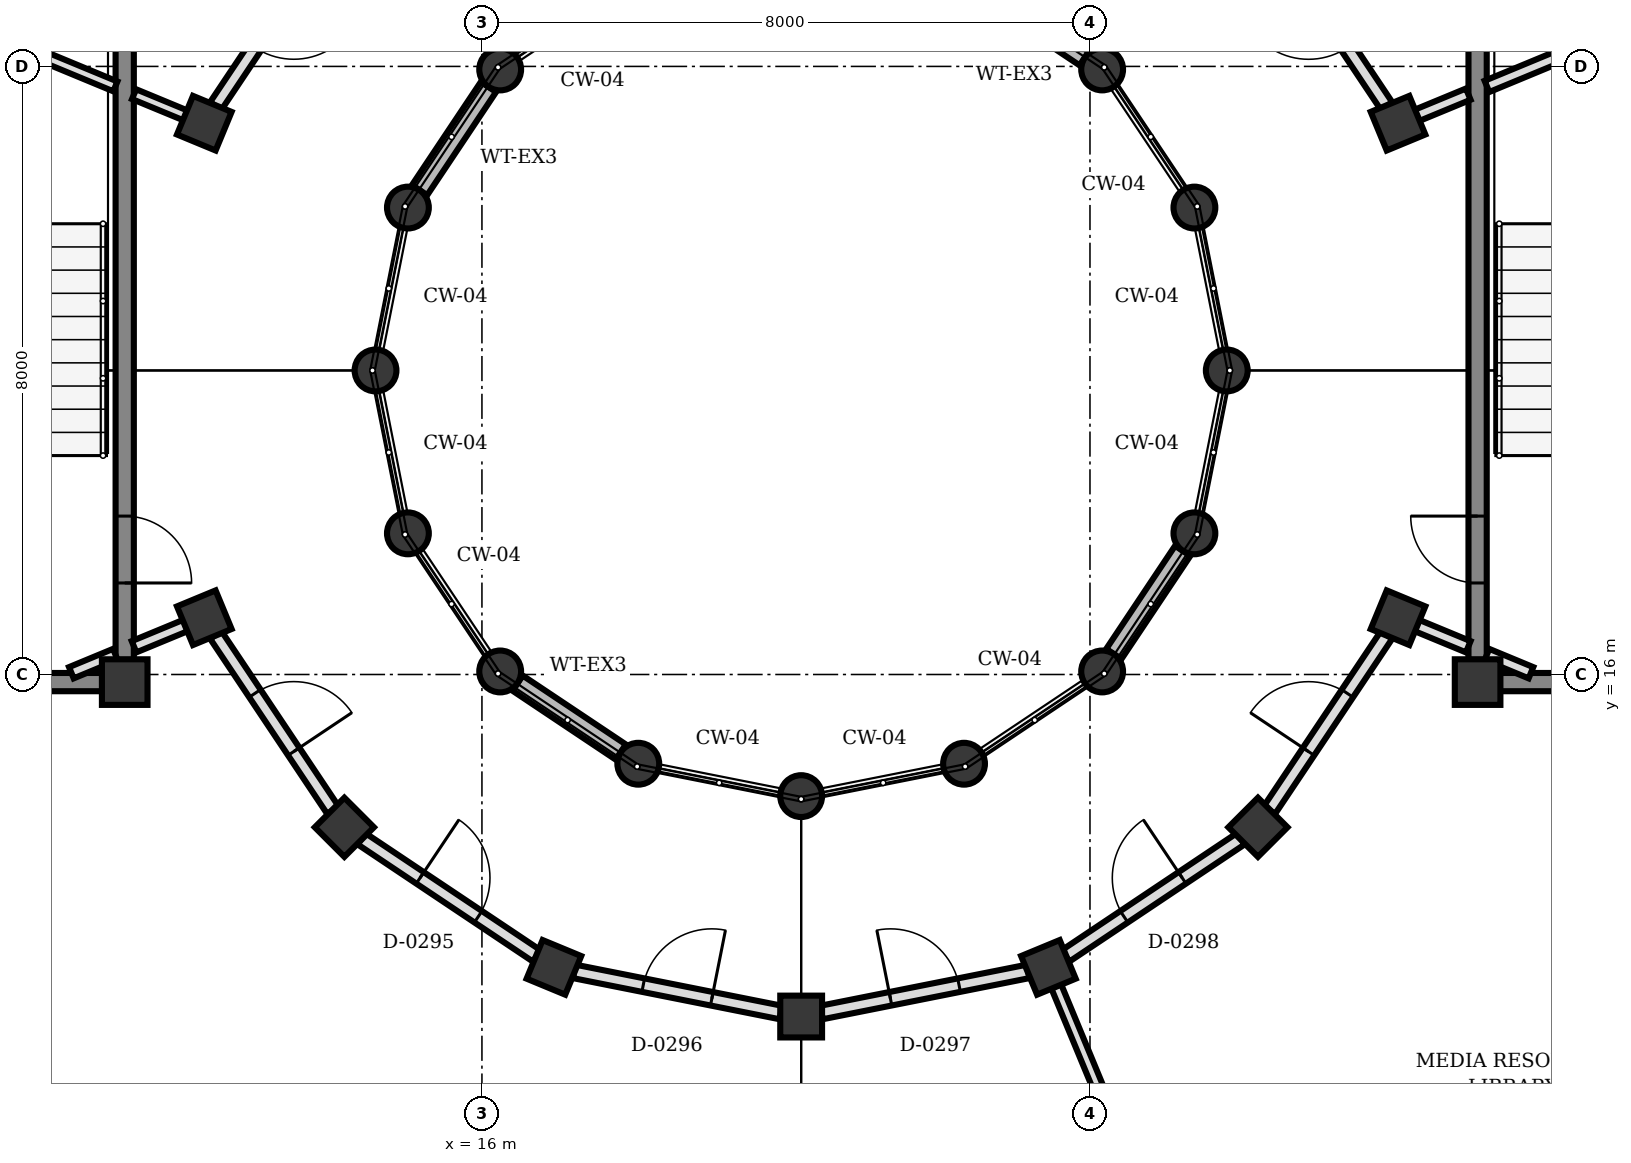
"""IFC4 building model, lengths in metres.
Left out: names, types, materials, properties, quantities, classifications, styles, units other than length and angle.
Written with IfcOpenShell. Run it as: python <this file> out.ifc"""

import sys

from ifc_helpers import new_model, si_unit, direction, frame, frame_2d, origin, origin_2d, place, context, subcontext, project, spatial, rectangle, circle, extrude, element, fill, save


model = new_model("IFC4")
c1 = context("Model", 3, precision=1e-05, world=origin(), true_north=direction((0.0, 1.0)))
c2 = subcontext(c1, "Body", "Model", "MODEL_VIEW")
j1 = project(units=[si_unit("LENGTHUNIT", "METRE"), si_unit("PLANEANGLEUNIT", "RADIAN")], contexts=[c1])
p1 = place(None, origin())
s1 = spatial("IfcSite", under=j1, at=p1, CompositionType="ELEMENT")
p2 = place(p1, origin())
s2 = spatial("IfcBuilding", under=s1, at=p2, CompositionType="ELEMENT")
p3 = place(p2, frame((0.0, 0.0, 4.5)))
s3 = spatial("IfcBuildingStorey", under=s2, at=p3, CompositionType="ELEMENT", Elevation=4.5)
for number, where, z_axis, x_axis in (
    (1, (11.3, 15.9, 0.0), (0.0, 0.0, 1.0), (1.0, 0.0, 0.0)),
    (2, (29.1, 15.9, 0.0), (0.0, 0.0, 1.0), (1.0, 0.0, 0.0)),
):
    element("IfcColumn", number, at=place(p3, frame(where, z_axis=z_axis, x_axis=x_axis)), inside=s3, PredefinedType="COLUMN", context=c2, shape_type="SweptSolid", body=[
        extrude(rectangle(XDim=0.6, YDim=0.6, at=origin_2d()), origin(), (0.0, 0.0, 1.0), 4.0),
    ])
for number, where, z_axis, x_axis in (
    (3, (25.8, 20.0, 0.0), (0.0, 0.0, 1.0), (1.0, 0.0, 0.0)),
    (4, (25.374, 22.143, 0.0), (0.0, 0.0, 1.0), (1.0, 0.0, 0.0)),
    (5, (24.16, 23.96, 0.0), (0.0, 0.0, 1.0), (1.0, 0.0, 0.0)),
    (6, (16.24, 23.96, 0.0), (0.0, 0.0, 1.0), (1.0, 0.0, 0.0)),
    (7, (15.026, 22.143, 0.0), (0.0, 0.0, 1.0), (1.0, 0.0, 0.0)),
    (8, (14.6, 20.0, 0.0), (0.0, 0.0, 1.0), (1.0, 0.0, 0.0)),
    (9, (15.026, 17.857, 0.0), (0.0, 0.0, 1.0), (1.0, 0.0, 0.0)),
    (10, (16.24, 16.04, 0.0), (0.0, 0.0, 1.0), (1.0, 0.0, 0.0)),
    (11, (18.057, 14.826, 0.0), (0.0, 0.0, 1.0), (1.0, 0.0, 0.0)),
    (12, (20.2, 14.4, 0.0), (0.0, 0.0, 1.0), (1.0, 0.0, 0.0)),
    (13, (22.343, 14.826, 0.0), (0.0, 0.0, 1.0), (1.0, 0.0, 0.0)),
    (14, (24.16, 16.04, 0.0), (0.0, 0.0, 1.0), (1.0, 0.0, 0.0)),
    (15, (25.374, 17.857, 0.0), (0.0, 0.0, 1.0), (1.0, 0.0, 0.0)),
):
    element("IfcColumn", number, at=place(p3, frame(where, z_axis=z_axis, x_axis=x_axis)), inside=s3, PredefinedType="COLUMN", context=c2, shape_type="SweptSolid", body=[
        extrude(circle(Radius=0.275, at=origin_2d()), origin(), (0.0, 0.0, 1.0), 4.0),
    ])
for number, where, z_axis, x_axis in (
    (16, (28.053, 23.253, 0.0), (0.0, 0.0, 1.0), (0.924, 0.383, 0.0)),
    (17, (12.347, 23.253, 0.0), (0.0, 0.0, 1.0), (-0.924, 0.383, 0.0)),
    (18, (12.347, 16.747, 0.0), (0.0, 0.0, 1.0), (-0.924, -0.383, 0.0)),
    (19, (14.19, 13.99, 0.0), (0.0, 0.0, 1.0), (-0.707, -0.707, 0.0)),
    (20, (16.947, 12.147, 0.0), (0.0, 0.0, 1.0), (-0.383, -0.924, 0.0)),
    (21, (20.2, 11.5, 0.0), (0.0, 0.0, 1.0), (0.0, -1.0, 0.0)),
    (22, (23.453, 12.147, 0.0), (0.0, 0.0, 1.0), (0.383, -0.924, 0.0)),
    (23, (26.21, 13.99, 0.0), (0.0, 0.0, 1.0), (0.707, -0.707, 0.0)),
    (24, (28.053, 16.747, 0.0), (0.0, 0.0, 1.0), (0.924, -0.383, 0.0)),
):
    element("IfcColumn", number, at=place(p3, frame(where, z_axis=z_axis, x_axis=x_axis)), inside=s3, PredefinedType="COLUMN", context=c2, shape_type="SweptSolid", body=[
        extrude(rectangle(XDim=0.55, YDim=0.55, at=origin_2d()), origin(), (0.0, 0.0, 1.0), 4.0),
    ])
for number, where, z_axis, x_axis in (
    (25, (23.93, 24.114, 0.0), (0.0, 0.0, 1.0), (-0.832, 0.555, 0.0)),
    (26, (16.086, 23.73, 0.0), (0.0, 0.0, 1.0), (-0.555, -0.832, 0.0)),
    (27, (16.47, 15.886, 0.0), (0.0, 0.0, 1.0), (0.832, -0.555, 0.0)),
    (28, (24.314, 16.27, 0.0), (0.0, 0.0, 1.0), (0.555, 0.832, 0.0)),
):
    element("IfcWall", number, at=place(p3, frame(where, z_axis=z_axis, x_axis=x_axis)), inside=s3, PredefinedType="SOLIDWALL", context=c2, shape_type="SweptSolid", body=[
        extrude(rectangle(XDim=1.632, YDim=0.24, at=frame_2d((0.816, 0.0))), origin(), (0.0, 0.0, 1.0), 3.222),
    ])
p4 = place(p3, frame((11.3, 24.328, 0.0), z_axis=(0.0, 0.0, 1.0), x_axis=(0.0, -1.0, 0.0)))
e29 = element("IfcWall", 29, at=p4, inside=s3, PredefinedType="SHEAR", context=c2, shape_type="SweptSolid", body=[
    extrude(rectangle(XDim=8.136, YDim=0.24, at=frame_2d((4.068, 0.0))), origin(), (0.0, 0.0, 1.0), 3.74),
])
p5 = place(p4, frame((6.244, 0.0, 0.0)))
e30 = element("IfcOpeningElement", 30, at=p5, cuts=e29, PredefinedType="OPENING", context=c2, shape_type="SweptSolid", body=[
    extrude(rectangle(XDim=0.88, YDim=2.1, at=frame_2d((0.44, 1.05))), frame((0.0, 0.13, 0.0), z_axis=(0.0, -1.0, 0.0), x_axis=(1.0, 0.0, 0.0)), (0.0, 0.0, 1.0), 0.26),
])
p6 = place(p3, frame((11.008, 15.9, 0.0), z_axis=(0.0, 0.0, 1.0), x_axis=(-1.0, 0.0, 0.0)))
e31 = element("IfcWall", 31, at=p6, inside=s3, PredefinedType="SHEAR", context=c2, shape_type="SweptSolid", body=[
    extrude(rectangle(XDim=4.216, YDim=0.24, at=frame_2d((2.108, 0.0))), origin(), (0.0, 0.0, 1.0), 3.74),
])
p7 = place(p3, frame((29.1, 16.192, 0.0), z_axis=(0.0, 0.0, 1.0), x_axis=(0.0, 1.0, 0.0)))
e32 = element("IfcWall", 32, at=p7, inside=s3, PredefinedType="SHEAR", context=c2, shape_type="SweptSolid", body=[
    extrude(rectangle(XDim=8.136, YDim=0.24, at=frame_2d((4.068, 0.0))), origin(), (0.0, 0.0, 1.0), 3.74),
])
p8 = place(p7, frame((1.012, 0.0, 0.0)))
e33 = element("IfcOpeningElement", 33, at=p8, cuts=e32, PredefinedType="OPENING", context=c2, shape_type="SweptSolid", body=[
    extrude(rectangle(XDim=0.88, YDim=2.1, at=frame_2d((0.44, 1.05))), frame((0.0, 0.13, 0.0), z_axis=(0.0, -1.0, 0.0), x_axis=(1.0, 0.0, 0.0)), (0.0, 0.0, 1.0), 0.26),
])
p9 = place(p3, frame((33.608, 15.9, 0.0), z_axis=(0.0, 0.0, 1.0), x_axis=(-1.0, 0.0, 0.0)))
e34 = element("IfcWall", 34, at=p9, inside=s3, PredefinedType="SHEAR", context=c2, shape_type="SweptSolid", body=[
    extrude(rectangle(XDim=4.216, YDim=0.24, at=frame_2d((2.108, 0.0))), origin(), (0.0, 0.0, 1.0), 3.74),
])
p10 = place(p3, frame((28.3, 23.355, 0.0), z_axis=(0.0, 0.0, 1.0), x_axis=(0.924069600435, 0.382224245113, 0.0)))
e35 = element("IfcWall", 35, at=p10, inside=s3, PredefinedType="PARTITIONING", context=c2, shape_type="SweptSolid", body=[
    extrude(rectangle(XDim=0.733, YDim=0.16, at=frame_2d((0.366, 0.0))), origin(), (0.0, 0.0, 1.0), 3.7),
])
p11 = place(p3, frame((29.223, 23.737, 0.0), z_axis=(0.0, 0.0, 1.0), x_axis=(0.923817443679, 0.382833293686, 0.0)))
e36 = element("IfcWall", 36, at=p11, inside=s3, PredefinedType="PARTITIONING", context=c2, shape_type="SweptSolid", body=[
    extrude(rectangle(XDim=1.985, YDim=0.16, at=frame_2d((0.993, 0.0))), origin(), (0.0, 0.0, 1.0), 3.7),
])
p12 = place(p3, frame((12.1, 23.355, 0.0), z_axis=(0.0, 0.0, 1.0), x_axis=(-0.924069600435, 0.382224245113, 0.0)))
e37 = element("IfcWall", 37, at=p12, inside=s3, PredefinedType="PARTITIONING", context=c2, shape_type="SweptSolid", body=[
    extrude(rectangle(XDim=0.733, YDim=0.14, at=frame_2d((0.366, 0.0))), origin(), (0.0, 0.0, 1.0), 3.7),
])
p13 = place(p3, frame((11.177, 23.737, 0.0), z_axis=(0.0, 0.0, 1.0), x_axis=(-0.923817443679, 0.382833293686, 0.0)))
e38 = element("IfcWall", 38, at=p13, inside=s3, PredefinedType="PARTITIONING", context=c2, shape_type="SweptSolid", body=[
    extrude(rectangle(XDim=1.985, YDim=0.14, at=frame_2d((0.993, 0.0))), origin(), (0.0, 0.0, 1.0), 3.7),
])
p14 = place(p3, frame((12.1, 16.645, 0.0), z_axis=(0.0, 0.0, 1.0), x_axis=(-0.924069600435, -0.382224245113, 0.0)))
e39 = element("IfcWall", 39, at=p14, inside=s3, PredefinedType="PARTITIONING", context=c2, shape_type="SweptSolid", body=[
    extrude(rectangle(XDim=0.733, YDim=0.16, at=frame_2d((0.366, 0.0))), origin(), (0.0, 0.0, 1.0), 3.072),
])
p15 = place(p3, frame((11.177, 16.263, 0.0), z_axis=(0.0, 0.0, 1.0), x_axis=(-0.923812676193, -0.382844797933, 0.0)))
e40 = element("IfcWall", 40, at=p15, inside=s3, PredefinedType="PARTITIONING", context=c2, shape_type="SweptSolid", body=[
    extrude(rectangle(XDim=0.627, YDim=0.16, at=frame_2d((0.313, 0.0))), origin(), (0.0, 0.0, 1.0), 3.072),
])
p16 = place(p3, frame((23.555, 11.9, 0.0), z_axis=(0.0, 0.0, 1.0), x_axis=(0.382683896966, -0.923879340067, 0.0)))
e41 = element("IfcWall", 41, at=p16, inside=s3, PredefinedType="PARTITIONING", context=c2, shape_type="SweptSolid", body=[
    extrude(rectangle(XDim=8.44, YDim=0.14, at=frame_2d((4.22, 0.0))), origin(), (0.0, 0.0, 1.0), 3.072),
])
p17 = place(p3, frame((28.3, 16.645, 0.0), z_axis=(0.0, 0.0, 1.0), x_axis=(0.924069600435, -0.382224245113, 0.0)))
e42 = element("IfcWall", 42, at=p17, inside=s3, PredefinedType="PARTITIONING", context=c2, shape_type="SweptSolid", body=[
    extrude(rectangle(XDim=0.733, YDim=0.16, at=frame_2d((0.366, 0.0))), origin(), (0.0, 0.0, 1.0), 3.072),
])
p18 = place(p3, frame((29.223, 16.263, 0.0), z_axis=(0.0, 0.0, 1.0), x_axis=(0.923812676193, -0.382844797933, 0.0)))
e43 = element("IfcWall", 43, at=p18, inside=s3, PredefinedType="PARTITIONING", context=c2, shape_type="SweptSolid", body=[
    extrude(rectangle(XDim=0.627, YDim=0.16, at=frame_2d((0.313, 0.0))), origin(), (0.0, 0.0, 1.0), 3.072),
])
p19 = place(p3, frame((27.902, 23.479, 0.0), z_axis=(0.0, 0.0, 1.0), x_axis=(-0.555797002478, 0.831318045056, 0.0)))
e44 = element("IfcWall", 44, at=p19, inside=s3, PredefinedType="PARTITIONING", context=c2, shape_type="SweptSolid", body=[
    extrude(rectangle(XDim=2.773, YDim=0.18, at=frame_2d((1.386, 0.0))), origin(), (0.0, 0.0, 1.0), 3.072),
])
p20 = place(p19, frame((0.926, 0.0, 0.0)))
e45 = element("IfcOpeningElement", 45, at=p20, cuts=e44, PredefinedType="OPENING", context=c2, shape_type="SweptSolid", body=[
    extrude(rectangle(XDim=0.92, YDim=2.1, at=frame_2d((0.46, 1.05))), frame((0.0, 0.1, 0.0), z_axis=(0.0, -1.0, 0.0), x_axis=(1.0, 0.0, 0.0)), (0.0, 0.0, 1.0), 0.2),
])
p21 = place(p3, frame((14.039, 25.784, 0.0), z_axis=(0.0, 0.0, 1.0), x_axis=(-0.555797002478, -0.831318045056, 0.0)))
e46 = element("IfcWall", 46, at=p21, inside=s3, PredefinedType="PARTITIONING", context=c2, shape_type="SweptSolid", body=[
    extrude(rectangle(XDim=2.773, YDim=0.18, at=frame_2d((1.386, 0.0))), origin(), (0.0, 0.0, 1.0), 3.072),
])
p22 = place(p21, frame((0.926, 0.0, 0.0)))
e47 = element("IfcOpeningElement", 47, at=p22, cuts=e46, PredefinedType="OPENING", context=c2, shape_type="SweptSolid", body=[
    extrude(rectangle(XDim=0.92, YDim=2.1, at=frame_2d((0.46, 1.05))), frame((0.0, 0.1, 0.0), z_axis=(0.0, -1.0, 0.0), x_axis=(1.0, 0.0, 0.0)), (0.0, 0.0, 1.0), 0.2),
])
p23 = place(p3, frame((12.498, 16.521, 0.0), z_axis=(0.0, 0.0, 1.0), x_axis=(0.555797002478, -0.831318045056, 0.0)))
e48 = element("IfcWall", 48, at=p23, inside=s3, PredefinedType="PARTITIONING", context=c2, shape_type="SweptSolid", body=[
    extrude(rectangle(XDim=2.773, YDim=0.18, at=frame_2d((1.386, 0.0))), origin(), (0.0, 0.0, 1.0), 3.072),
])
p24 = place(p23, frame((0.926, 0.0, 0.0)))
e49 = element("IfcOpeningElement", 49, at=p24, cuts=e48, PredefinedType="OPENING", context=c2, shape_type="SweptSolid", body=[
    extrude(rectangle(XDim=0.92, YDim=2.1, at=frame_2d((0.46, 1.05))), frame((0.0, 0.1, 0.0), z_axis=(0.0, -1.0, 0.0), x_axis=(1.0, 0.0, 0.0)), (0.0, 0.0, 1.0), 0.2),
])
p25 = place(p3, frame((14.416, 13.839, 0.0), z_axis=(0.0, 0.0, 1.0), x_axis=(0.831318045056, -0.555797002478, 0.0)))
e50 = element("IfcWall", 50, at=p25, inside=s3, PredefinedType="PARTITIONING", context=c2, shape_type="SweptSolid", body=[
    extrude(rectangle(XDim=2.773, YDim=0.18, at=frame_2d((1.386, 0.0))), origin(), (0.0, 0.0, 1.0), 3.072),
])
p26 = place(p25, frame((0.926, 0.0, 0.0)))
e51 = element("IfcOpeningElement", 51, at=p26, cuts=e50, PredefinedType="OPENING", context=c2, shape_type="SweptSolid", body=[
    extrude(rectangle(XDim=0.92, YDim=2.1, at=frame_2d((0.46, 1.05))), frame((0.0, 0.1, 0.0), z_axis=(0.0, -1.0, 0.0), x_axis=(1.0, 0.0, 0.0)), (0.0, 0.0, 1.0), 0.2),
])
p27 = place(p3, frame((17.214, 12.094, 0.0), z_axis=(0.0, 0.0, 1.0), x_axis=(0.980773264811, -0.195150718759, 0.0)))
e52 = element("IfcWall", 52, at=p27, inside=s3, PredefinedType="PARTITIONING", context=c2, shape_type="SweptSolid", body=[
    extrude(rectangle(XDim=2.772, YDim=0.18, at=frame_2d((1.386, 0.0))), origin(), (0.0, 0.0, 1.0), 3.072),
])
p28 = place(p27, frame((0.926, 0.0, 0.0)))
e53 = element("IfcOpeningElement", 53, at=p28, cuts=e52, PredefinedType="OPENING", context=c2, shape_type="SweptSolid", body=[
    extrude(rectangle(XDim=0.92, YDim=2.1, at=frame_2d((0.46, 1.05))), frame((0.0, 0.1, 0.0), z_axis=(0.0, -1.0, 0.0), x_axis=(1.0, 0.0, 0.0)), (0.0, 0.0, 1.0), 0.2),
])
p29 = place(p3, frame((20.467, 11.553, 0.0), z_axis=(0.0, 0.0, 1.0), x_axis=(0.980773264811, 0.195150718759, 0.0)))
e54 = element("IfcWall", 54, at=p29, inside=s3, PredefinedType="PARTITIONING", context=c2, shape_type="SweptSolid", body=[
    extrude(rectangle(XDim=2.772, YDim=0.18, at=frame_2d((1.386, 0.0))), origin(), (0.0, 0.0, 1.0), 3.072),
])
p30 = place(p29, frame((0.926, 0.0, 0.0)))
e55 = element("IfcOpeningElement", 55, at=p30, cuts=e54, PredefinedType="OPENING", context=c2, shape_type="SweptSolid", body=[
    extrude(rectangle(XDim=0.92, YDim=2.1, at=frame_2d((0.46, 1.05))), frame((0.0, 0.1, 0.0), z_axis=(0.0, -1.0, 0.0), x_axis=(1.0, 0.0, 0.0)), (0.0, 0.0, 1.0), 0.2),
])
p31 = place(p3, frame((23.679, 12.298, 0.0), z_axis=(0.0, 0.0, 1.0), x_axis=(0.831318045056, 0.555797002478, 0.0)))
e56 = element("IfcWall", 56, at=p31, inside=s3, PredefinedType="PARTITIONING", context=c2, shape_type="SweptSolid", body=[
    extrude(rectangle(XDim=2.773, YDim=0.18, at=frame_2d((1.386, 0.0))), origin(), (0.0, 0.0, 1.0), 3.072),
])
p32 = place(p31, frame((0.926, 0.0, 0.0)))
e57 = element("IfcOpeningElement", 57, at=p32, cuts=e56, PredefinedType="OPENING", context=c2, shape_type="SweptSolid", body=[
    extrude(rectangle(XDim=0.92, YDim=2.1, at=frame_2d((0.46, 1.05))), frame((0.0, 0.1, 0.0), z_axis=(0.0, -1.0, 0.0), x_axis=(1.0, 0.0, 0.0)), (0.0, 0.0, 1.0), 0.2),
])
p33 = place(p3, frame((26.361, 14.216, 0.0), z_axis=(0.0, 0.0, 1.0), x_axis=(0.555797002478, 0.831318045056, 0.0)))
e58 = element("IfcWall", 58, at=p33, inside=s3, PredefinedType="PARTITIONING", context=c2, shape_type="SweptSolid", body=[
    extrude(rectangle(XDim=2.773, YDim=0.18, at=frame_2d((1.386, 0.0))), origin(), (0.0, 0.0, 1.0), 3.072),
])
p34 = place(p33, frame((0.926, 0.0, 0.0)))
e59 = element("IfcOpeningElement", 59, at=p34, cuts=e58, PredefinedType="OPENING", context=c2, shape_type="SweptSolid", body=[
    extrude(rectangle(XDim=0.92, YDim=2.1, at=frame_2d((0.46, 1.05))), frame((0.0, 0.1, 0.0), z_axis=(0.0, -1.0, 0.0), x_axis=(1.0, 0.0, 0.0)), (0.0, 0.0, 1.0), 0.2),
])
p35 = place(p5, origin())
e60 = element("IfcDoor", 60, at=p35, inside=s3, OperationType="SINGLE_SWING_RIGHT", PredefinedType="DOOR", context=c2, shape_type="SweptSolid", body=[
    extrude(rectangle(XDim=0.88, YDim=2.1, at=frame_2d((0.44, 1.05))), frame((0.0, 0.025, 0.0), z_axis=(0.0, -1.0, 0.0), x_axis=(1.0, 0.0, 0.0)), (0.0, 0.0, 1.0), 0.05),
])
fill(e30, e60)
p36 = place(p8, origin())
e61 = element("IfcDoor", 61, at=p36, inside=s3, OperationType="SINGLE_SWING_RIGHT", PredefinedType="DOOR", context=c2, shape_type="SweptSolid", body=[
    extrude(rectangle(XDim=0.88, YDim=2.1, at=frame_2d((0.44, 1.05))), frame((0.0, 0.025, 0.0), z_axis=(0.0, -1.0, 0.0), x_axis=(1.0, 0.0, 0.0)), (0.0, 0.0, 1.0), 0.05),
])
fill(e33, e61)
p37 = place(p24, origin())
e62 = element("IfcDoor", 62, at=p37, inside=s3, OperationType="SINGLE_SWING_RIGHT", PredefinedType="DOOR", context=c2, shape_type="SweptSolid", body=[
    extrude(rectangle(XDim=0.92, YDim=2.1, at=frame_2d((0.46, 1.05))), frame((0.0, 0.025, 0.0), z_axis=(0.0, -1.0, 0.0), x_axis=(1.0, 0.0, 0.0)), (0.0, 0.0, 1.0), 0.05),
])
fill(e49, e62)
p38 = place(p26, origin())
e63 = element("IfcDoor", 63, at=p38, inside=s3, OperationType="SINGLE_SWING_LEFT", PredefinedType="DOOR", context=c2, shape_type="SweptSolid", body=[
    extrude(rectangle(XDim=0.92, YDim=2.1, at=frame_2d((0.46, 1.05))), frame((0.0, 0.025, 0.0), z_axis=(0.0, -1.0, 0.0), x_axis=(1.0, 0.0, 0.0)), (0.0, 0.0, 1.0), 0.05),
])
fill(e51, e63)
p39 = place(p28, origin())
e64 = element("IfcDoor", 64, at=p39, inside=s3, OperationType="SINGLE_SWING_RIGHT", PredefinedType="DOOR", context=c2, shape_type="SweptSolid", body=[
    extrude(rectangle(XDim=0.92, YDim=2.1, at=frame_2d((0.46, 1.05))), frame((0.0, 0.025, 0.0), z_axis=(0.0, -1.0, 0.0), x_axis=(1.0, 0.0, 0.0)), (0.0, 0.0, 1.0), 0.05),
])
fill(e53, e64)
p40 = place(p30, origin())
e65 = element("IfcDoor", 65, at=p40, inside=s3, OperationType="SINGLE_SWING_LEFT", PredefinedType="DOOR", context=c2, shape_type="SweptSolid", body=[
    extrude(rectangle(XDim=0.92, YDim=2.1, at=frame_2d((0.46, 1.05))), frame((0.0, 0.025, 0.0), z_axis=(0.0, -1.0, 0.0), x_axis=(1.0, 0.0, 0.0)), (0.0, 0.0, 1.0), 0.05),
])
fill(e55, e65)
p41 = place(p32, origin())
e66 = element("IfcDoor", 66, at=p41, inside=s3, OperationType="SINGLE_SWING_RIGHT", PredefinedType="DOOR", context=c2, shape_type="SweptSolid", body=[
    extrude(rectangle(XDim=0.92, YDim=2.1, at=frame_2d((0.46, 1.05))), frame((0.0, 0.025, 0.0), z_axis=(0.0, -1.0, 0.0), x_axis=(1.0, 0.0, 0.0)), (0.0, 0.0, 1.0), 0.05),
])
fill(e57, e66)
p42 = place(p34, origin())
e67 = element("IfcDoor", 67, at=p42, inside=s3, OperationType="SINGLE_SWING_LEFT", PredefinedType="DOOR", context=c2, shape_type="SweptSolid", body=[
    extrude(rectangle(XDim=0.92, YDim=2.1, at=frame_2d((0.46, 1.05))), frame((0.0, 0.025, 0.0), z_axis=(0.0, -1.0, 0.0), x_axis=(1.0, 0.0, 0.0)), (0.0, 0.0, 1.0), 0.05),
])
fill(e59, e67)
save(model, sys.argv[1])
